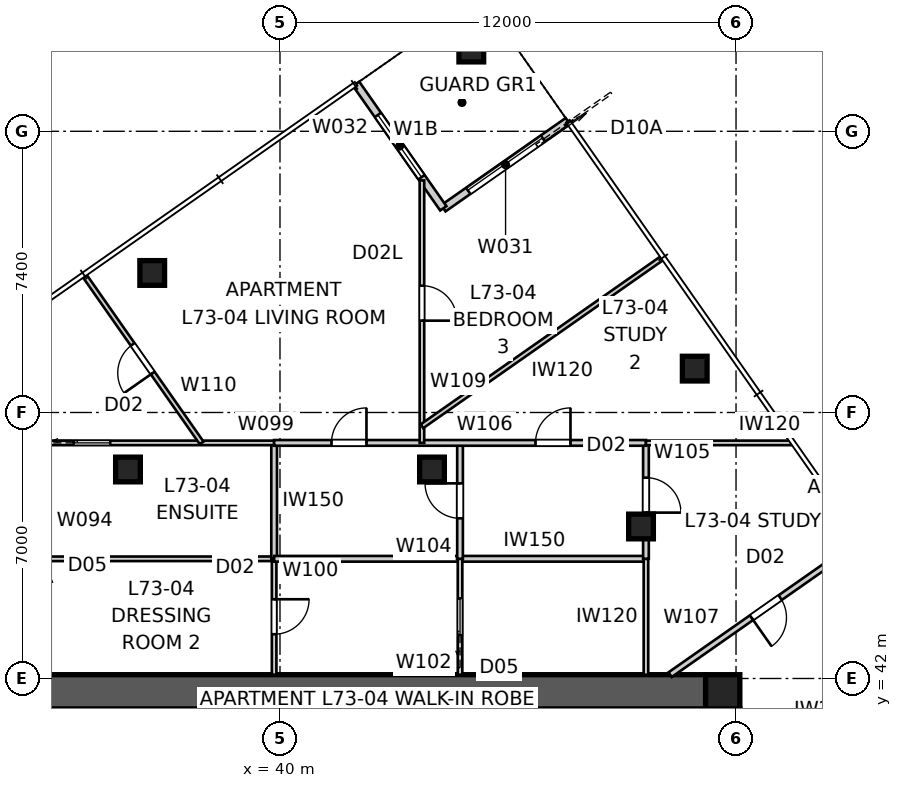
"""IFC4 building model, lengths in metres.
Left out: names, types, materials, properties, quantities, classifications, styles, units other than length and angle.
Written with IfcOpenShell. Run it as: python <this file> out.ifc"""

import sys

from ifc_helpers import new_model, si_unit, direction, frame, frame_2d, origin, origin_2d, place, context, subcontext, project, spatial, polyline, rectangle, outline, extrude, element, fill, save


model = new_model("IFC4")
c1 = context("Model", 3, precision=1e-05, world=origin(), true_north=direction((0.0, 1.0)))
c2 = subcontext(c1, "Body", "Model", "MODEL_VIEW")
j1 = project(units=[si_unit("LENGTHUNIT", "METRE"), si_unit("PLANEANGLEUNIT", "RADIAN")], contexts=[c1])
p1 = place(None, origin())
s1 = spatial("IfcSite", under=j1, at=p1, CompositionType="ELEMENT")
p2 = place(p1, origin())
s2 = spatial("IfcBuilding", under=s1, at=p2, CompositionType="ELEMENT")
p3 = place(p2, frame((0.0, 0.0, 264.2)))
s3 = spatial("IfcBuildingStorey", under=s2, at=p3, CompositionType="ELEMENT", Elevation=264.2)
p4 = place(p3, frame((28.8, 41.65, 0.0), z_axis=(0.0, 0.0, 1.0), x_axis=(1.0, 0.0, 0.0)))
e1 = element("IfcWall", 1, at=p4, inside=s3, PredefinedType="SHEAR", context=c2, shape_type="SweptSolid", body=[
    extrude(outline(polyline([(0.0, -0.45), (22.4, -0.45), (22.4, -0.025), (22.85, -0.025), (22.85, 0.025), (22.4, 0.025), (22.4, 0.45), (0.0, 0.45), (0.0, 0.025), (-0.45, 0.025), (-0.45, -0.025), (0.0, -0.025), (0.0, -0.45)])), origin(), (0.0, 0.0, 1.0), 3.4),
])
p5 = place(p3, frame((51.65, 18.8, 0.0), z_axis=(0.0, 0.0, 1.0), x_axis=(0.0, 1.0, 0.0)))
e2 = element("IfcWall", 2, at=p5, inside=s3, PredefinedType="SHEAR", context=c2, shape_type="SweptSolid", body=[
    extrude(outline(polyline([(0.0, -0.45), (22.4, -0.45), (22.4, -0.025), (22.85, -0.025), (22.85, 0.025), (22.4, 0.025), (22.4, 0.45), (0.0, 0.45), (0.0, 0.025), (-0.45, 0.025), (-0.45, -0.025), (0.0, -0.025), (0.0, -0.45)])), origin(), (0.0, 0.0, 1.0), 3.4),
])
p6 = place(p5, frame((11.14, 0.0, 0.0)))
e3 = element("IfcOpeningElement", 3, at=p6, cuts=e2, PredefinedType="OPENING", context=c2, shape_type="SweptSolid", body=[
    extrude(rectangle(XDim=1.02, YDim=2.4, at=frame_2d((0.51, 1.2))), frame((0.0, 0.46, 0.0), z_axis=(0.0, -1.0, 0.0), x_axis=(1.0, 0.0, 0.0)), (0.0, 0.0, 1.0), 0.92),
])
p7 = place(p3, frame((51.65, 41.65, 0.0), z_axis=(0.0, 0.0, 1.0), x_axis=(1.0, 0.0, 0.0)))
e4 = element("IfcColumn", 4, at=p7, inside=s3, PredefinedType="COLUMN", context=c2, shape_type="SweptSolid", body=[
    extrude(rectangle(XDim=0.9, YDim=0.9, at=origin_2d()), origin(), (0.0, 0.0, 1.0), 3.4),
])
for number, where, z_axis, x_axis in (
    (5, (50.914, 50.155, 0.0), (0.0, 0.0, 1.0), (1.0, 0.0, 0.0)),
    (6, (45.034, 58.551, 0.0), (0.0, 0.0, 1.0), (1.0, 0.0, 0.0)),
    (7, (36.638, 52.672, 0.0), (0.0, 0.0, 1.0), (1.0, 0.0, 0.0)),
):
    element("IfcColumn", number, at=place(p3, frame(where, z_axis=z_axis, x_axis=x_axis)), inside=s3, PredefinedType="COLUMN", context=c2, shape_type="SweptSolid", body=[
        extrude(rectangle(XDim=0.65, YDim=0.65, at=origin_2d()), origin(), (0.0, 0.0, 1.0), 3.2),
    ])
for number, where, z_axis, x_axis in (
    (8, (49.5, 46.0, 0.0), (0.0, 0.0, 1.0), (1.0, 0.0, 0.0)),
    (9, (44.0, 47.5, 0.0), (0.0, 0.0, 1.0), (1.0, 0.0, 0.0)),
    (10, (36.0, 47.5, 0.0), (0.0, 0.0, 1.0), (1.0, 0.0, 0.0)),
):
    element("IfcColumn", number, at=place(p3, frame(where, z_axis=z_axis, x_axis=x_axis)), inside=s3, PredefinedType="COLUMN", context=c2, shape_type="SweptSolid", body=[
        extrude(rectangle(XDim=0.65, YDim=0.65, at=origin_2d()), origin(), (0.0, 0.0, 1.0), 3.4),
    ])
p8 = place(p3, frame((47.574, 56.667, 0.0), z_axis=(0.0, 0.0, 1.0), x_axis=(-0.819165963305, -0.573556557423, 0.0)))
e11 = element("IfcWall", 11, at=p8, inside=s3, PredefinedType="SOLIDWALL", context=c2, shape_type="SweptSolid", body=[
    extrude(rectangle(XDim=4.0, YDim=0.2, at=frame_2d((2.0, 0.0))), origin(), (0.0, 0.0, 1.0), 3.2),
])
p9 = place(p8, frame((0.8, 0.0, 0.0)))
e12 = element("IfcOpeningElement", 12, at=p9, cuts=e11, PredefinedType="OPENING", context=c2, shape_type="SweptSolid", body=[
    extrude(rectangle(XDim=2.4, YDim=2.1, at=frame_2d((1.2, 1.05))), frame((0.0, 0.11, 0.0), z_axis=(0.0, -1.0, 0.0), x_axis=(1.0, 0.0, 0.0)), (0.0, 0.0, 1.0), 0.22),
])
p10 = place(p3, frame((44.298, 54.373, 0.0), z_axis=(0.0, 0.0, 1.0), x_axis=(-0.573597512525, 0.819137286189, 0.0)))
e13 = element("IfcWall", 13, at=p10, inside=s3, PredefinedType="SOLIDWALL", context=c2, shape_type="SweptSolid", body=[
    extrude(rectangle(XDim=4.0, YDim=0.2, at=frame_2d((2.0, 0.0))), origin(), (0.0, 0.0, 1.0), 3.2),
])
p11 = place(p10, frame((1.0, 0.0, 0.4)))
e14 = element("IfcOpeningElement", 14, at=p11, cuts=e13, PredefinedType="OPENING", context=c2, shape_type="SweptSolid", body=[
    extrude(rectangle(XDim=2.0, YDim=1.8, at=frame_2d((1.0, 0.9))), frame((0.0, 0.11, 0.0), z_axis=(0.0, -1.0, 0.0), x_axis=(1.0, 0.0, 0.0)), (0.0, 0.0, 1.0), 0.22),
])
p12 = place(p3, frame((57.612, 42.332, 0.0), z_axis=(0.0, 0.0, 1.0), x_axis=(-0.819161528122, -0.573562891796, 0.0)))
e15 = element("IfcWall", 15, at=p12, inside=s3, PredefinedType="PARTITIONING", context=c2, shape_type="SweptSolid", body=[
    extrude(rectangle(XDim=6.681, YDim=0.25, at=frame_2d((3.341, 0.0))), origin(), (0.0, 0.0, 1.0), 3.2),
])
p13 = place(p3, frame((28.255, 45.148, 0.0), z_axis=(0.0, 0.0, 1.0), x_axis=(0.99999998913, 0.000147442917, 0.0)))
e16 = element("IfcWall", 16, at=p13, inside=s3, PredefinedType="PARTITIONING", context=c2, shape_type="SweptSolid", body=[
    extrude(rectangle(XDim=11.591, YDim=0.12, at=frame_2d((5.795, 0.0))), origin(), (0.0, 0.0, 1.0), 3.2),
])
p14 = place(p3, frame((39.846, 48.2, 0.0), z_axis=(0.0, 0.0, 1.0), x_axis=(0.0, -1.0, 0.0)))
e17 = element("IfcWall", 17, at=p14, inside=s3, PredefinedType="SOLIDWALL", context=c2, shape_type="SweptSolid", body=[
    extrude(rectangle(XDim=3.05, YDim=0.15, at=frame_2d((1.525, 0.0))), origin(), (0.0, 0.0, 1.0), 3.2),
])
p15 = place(p3, frame((33.907, 48.2, 0.0), z_axis=(0.0, 0.0, 1.0), x_axis=(1.0, 0.0, 0.0)))
e18 = element("IfcWall", 18, at=p15, inside=s3, PredefinedType="PARTITIONING", context=c2, shape_type="SweptSolid", body=[
    extrude(rectangle(XDim=5.939, YDim=0.12, at=frame_2d((2.969, 0.0))), origin(), (0.0, 0.0, 1.0), 3.2),
])
p16 = place(p15, frame((0.666, 0.0, 0.0)))
e19 = element("IfcOpeningElement", 19, at=p16, cuts=e18, PredefinedType="OPENING", context=c2, shape_type="SweptSolid", body=[
    extrude(rectangle(XDim=0.96, YDim=2.1, at=frame_2d((0.48, 1.05))), frame((0.0, 0.07, 0.0), z_axis=(0.0, -1.0, 0.0), x_axis=(1.0, 0.0, 0.0)), (0.0, 0.0, 1.0), 0.14),
])
p17 = place(p3, frame((39.846, 45.15, 0.0), z_axis=(0.0, 0.0, 1.0), x_axis=(0.0, -1.0, 0.0)))
e20 = element("IfcWall", 20, at=p17, inside=s3, PredefinedType="PARTITIONING", context=c2, shape_type="SweptSolid", body=[
    extrude(rectangle(XDim=3.05, YDim=0.12, at=frame_2d((1.525, 0.0))), origin(), (0.0, 0.0, 1.0), 3.2),
])
p18 = place(p17, frame((1.065, 0.0, 0.0)))
e21 = element("IfcOpeningElement", 21, at=p18, cuts=e20, PredefinedType="OPENING", context=c2, shape_type="SweptSolid", body=[
    extrude(rectangle(XDim=0.92, YDim=2.34, at=frame_2d((0.46, 1.17))), frame((0.0, 0.07, 0.0), z_axis=(0.0, -1.0, 0.0), x_axis=(1.0, 0.0, 0.0)), (0.0, 0.0, 1.0), 0.14),
])
p19 = place(p3, frame((39.846, 45.15, 0.0), z_axis=(0.0, 0.0, 1.0), x_axis=(1.0, 0.0, 0.0)))
e22 = element("IfcWall", 22, at=p19, inside=s3, PredefinedType="SOLIDWALL", context=c2, shape_type="SweptSolid", body=[
    extrude(rectangle(XDim=9.784, YDim=0.15, at=frame_2d((4.892, 0.0))), origin(), (0.0, 0.0, 1.0), 3.2),
])
p20 = place(p3, frame((44.738, 42.1, 0.0), z_axis=(0.0, 0.0, 1.0), x_axis=(0.0, 1.0, 0.0)))
e23 = element("IfcWall", 23, at=p20, inside=s3, PredefinedType="PARTITIONING", context=c2, shape_type="SweptSolid", body=[
    extrude(rectangle(XDim=3.05, YDim=0.12, at=frame_2d((1.525, 0.0))), origin(), (0.0, 0.0, 1.0), 3.2),
])
p21 = place(p20, frame((1.045, 0.0, 0.0)))
e24 = element("IfcOpeningElement", 24, at=p21, cuts=e23, PredefinedType="OPENING", context=c2, shape_type="SweptSolid", body=[
    extrude(rectangle(XDim=0.96, YDim=2.1, at=frame_2d((0.48, 1.05))), frame((0.0, 0.07, 0.0), z_axis=(0.0, -1.0, 0.0), x_axis=(1.0, 0.0, 0.0)), (0.0, 0.0, 1.0), 0.14),
])
p22 = place(p3, frame((49.63, 45.15, 0.0), z_axis=(0.0, 0.0, 1.0), x_axis=(0.0, -1.0, 0.0)))
e25 = element("IfcWall", 25, at=p22, inside=s3, PredefinedType="PARTITIONING", context=c2, shape_type="SweptSolid", body=[
    extrude(rectangle(XDim=3.05, YDim=0.12, at=frame_2d((1.525, 0.0))), origin(), (0.0, 0.0, 1.0), 3.2),
])
p23 = place(p3, frame((44.738, 45.15, 0.0), z_axis=(0.0, 0.0, 1.0), x_axis=(0.0, 1.0, 0.0)))
e26 = element("IfcWall", 26, at=p23, inside=s3, PredefinedType="SOLIDWALL", context=c2, shape_type="SweptSolid", body=[
    extrude(rectangle(XDim=3.05, YDim=0.15, at=frame_2d((1.525, 0.0))), origin(), (0.0, 0.0, 1.0), 3.2),
])
p24 = place(p23, frame((1.065, 0.0, 0.0)))
e27 = element("IfcOpeningElement", 27, at=p24, cuts=e26, PredefinedType="OPENING", context=c2, shape_type="SweptSolid", body=[
    extrude(rectangle(XDim=0.92, YDim=2.1, at=frame_2d((0.46, 1.05))), frame((0.0, 0.085, 0.0), z_axis=(0.0, -1.0, 0.0), x_axis=(1.0, 0.0, 0.0)), (0.0, 0.0, 1.0), 0.17),
])
p25 = place(p3, frame((49.63, 48.2, 0.0), z_axis=(0.0, 0.0, 1.0), x_axis=(0.0, -1.0, 0.0)))
e28 = element("IfcWall", 28, at=p25, inside=s3, PredefinedType="SOLIDWALL", context=c2, shape_type="SweptSolid", body=[
    extrude(rectangle(XDim=3.05, YDim=0.15, at=frame_2d((1.525, 0.0))), origin(), (0.0, 0.0, 1.0), 3.2),
])
p26 = place(p25, frame((0.915, 0.0, 0.0)))
e29 = element("IfcOpeningElement", 29, at=p26, cuts=e28, PredefinedType="OPENING", context=c2, shape_type="SweptSolid", body=[
    extrude(rectangle(XDim=0.92, YDim=2.34, at=frame_2d((0.46, 1.17))), frame((0.0, 0.085, 0.0), z_axis=(0.0, -1.0, 0.0), x_axis=(1.0, 0.0, 0.0)), (0.0, 0.0, 1.0), 0.17),
])
p27 = place(p3, frame((39.846, 48.2, 0.0), z_axis=(0.0, 0.0, 1.0), x_axis=(1.0, 0.0, 0.0)))
e30 = element("IfcWall", 30, at=p27, inside=s3, PredefinedType="SOLIDWALL", context=c2, shape_type="SweptSolid", body=[
    extrude(rectangle(XDim=9.784, YDim=0.15, at=frame_2d((4.892, 0.0))), origin(), (0.0, 0.0, 1.0), 3.2),
])
p28 = place(p27, frame((1.51, 0.0, 0.0)))
e31 = element("IfcOpeningElement", 31, at=p28, cuts=e30, PredefinedType="OPENING", context=c2, shape_type="SweptSolid", body=[
    extrude(rectangle(XDim=0.92, YDim=2.34, at=frame_2d((0.46, 1.17))), frame((0.0, 0.085, 0.0), z_axis=(0.0, -1.0, 0.0), x_axis=(1.0, 0.0, 0.0)), (0.0, 0.0, 1.0), 0.17),
])
p29 = place(p27, frame((6.878, 0.0, 0.0)))
e32 = element("IfcOpeningElement", 32, at=p29, cuts=e30, PredefinedType="OPENING", context=c2, shape_type="SweptSolid", body=[
    extrude(rectangle(XDim=0.92, YDim=2.34, at=frame_2d((0.46, 1.17))), frame((0.0, 0.085, 0.0), z_axis=(0.0, -1.0, 0.0), x_axis=(1.0, 0.0, 0.0)), (0.0, 0.0, 1.0), 0.17),
])
p30 = place(p3, frame((55.271, 45.605, 0.0), z_axis=(0.0, 0.0, 1.0), x_axis=(-0.819158711158, -0.573566914958, 0.0)))
e33 = element("IfcWall", 33, at=p30, inside=s3, PredefinedType="SOLIDWALL", context=c2, shape_type="SweptSolid", body=[
    extrude(rectangle(XDim=6.111, YDim=0.15, at=frame_2d((3.055, 0.0))), origin(), (0.0, 0.0, 1.0), 3.2),
])
p31 = place(p30, frame((2.575, 0.0, 0.0)))
e34 = element("IfcOpeningElement", 34, at=p31, cuts=e33, PredefinedType="OPENING", context=c2, shape_type="SweptSolid", body=[
    extrude(rectangle(XDim=0.92, YDim=2.34, at=frame_2d((0.46, 1.17))), frame((0.0, 0.085, 0.0), z_axis=(0.0, -1.0, 0.0), x_axis=(1.0, 0.0, 0.0)), (0.0, 0.0, 1.0), 0.17),
])
p32 = place(p3, frame((49.63, 48.2, 0.0), z_axis=(0.0, 0.0, 1.0), x_axis=(1.0, 0.0, 0.0)))
e35 = element("IfcWall", 35, at=p32, inside=s3, PredefinedType="PARTITIONING", context=c2, shape_type="SweptSolid", body=[
    extrude(rectangle(XDim=3.824, YDim=0.12, at=frame_2d((1.912, 0.0))), origin(), (0.0, 0.0, 1.0), 3.2),
])
p33 = place(p3, frame((43.735, 55.106, 0.0), z_axis=(0.0, 0.0, 1.0), x_axis=(0.0, -1.0, 0.0)))
e36 = element("IfcWall", 36, at=p33, inside=s3, PredefinedType="PARTITIONING", context=c2, shape_type="SweptSolid", body=[
    extrude(rectangle(XDim=6.906, YDim=0.12, at=frame_2d((3.453, 0.0))), origin(), (0.0, 0.0, 1.0), 2.3),
])
p34 = place(p33, frame((2.77, 0.0, 0.0)))
e37 = element("IfcOpeningElement", 37, at=p34, cuts=e36, PredefinedType="OPENING", context=c2, shape_type="SweptSolid", body=[
    extrude(rectangle(XDim=0.92, YDim=2.1, at=frame_2d((0.46, 1.05))), frame((0.0, 0.07, 0.0), z_axis=(0.0, -1.0, 0.0), x_axis=(1.0, 0.0, 0.0)), (0.0, 0.0, 1.0), 0.14),
])
p35 = place(p3, frame((37.938, 48.2, 0.0), z_axis=(0.0, 0.0, 1.0), x_axis=(-0.573560001964, 0.819163551525, 0.0)))
e38 = element("IfcWall", 38, at=p35, inside=s3, PredefinedType="PARTITIONING", context=c2, shape_type="SweptSolid", body=[
    extrude(rectangle(XDim=5.369, YDim=0.12, at=frame_2d((2.685, 0.0))), origin(), (0.0, 0.0, 1.0), 3.2),
])
p36 = place(p35, frame((2.244, 0.0, 0.0)))
e39 = element("IfcOpeningElement", 39, at=p36, cuts=e38, PredefinedType="OPENING", context=c2, shape_type="SweptSolid", body=[
    extrude(rectangle(XDim=0.92, YDim=2.34, at=frame_2d((0.46, 1.17))), frame((0.0, 0.07, 0.0), z_axis=(0.0, -1.0, 0.0), x_axis=(1.0, 0.0, 0.0)), (0.0, 0.0, 1.0), 0.14),
])
p37 = place(p3, frame((50.051, 53.06, 0.0), z_axis=(0.0, 0.0, 1.0), x_axis=(-0.819161994693, -0.573562225439, 0.0)))
e40 = element("IfcWall", 40, at=p37, inside=s3, PredefinedType="PARTITIONING", context=c2, shape_type="SweptSolid", body=[
    extrude(rectangle(XDim=7.71, YDim=0.12, at=frame_2d((3.855, 0.0))), origin(), (0.0, 0.0, 1.0), 3.2),
])
p38 = place(p9, origin())
e41 = element("IfcDoor", 41, at=p38, inside=s3, OperationType="SLIDING_TO_LEFT", PredefinedType="DOOR", context=c2, shape_type="SweptSolid", body=[
    extrude(rectangle(XDim=2.4, YDim=2.1, at=frame_2d((1.2, 1.05))), frame((0.0, 0.025, 0.0), z_axis=(0.0, -1.0, 0.0), x_axis=(1.0, 0.0, 0.0)), (0.0, 0.0, 1.0), 0.05),
])
fill(e12, e41)
p39 = place(p11, origin())
e42 = element("IfcWindow", 42, at=p39, inside=s3, PartitioningType="SINGLE_PANEL", PredefinedType="WINDOW", context=c2, shape_type="SweptSolid", body=[
    extrude(rectangle(XDim=2.0, YDim=1.8, at=frame_2d((1.0, 0.9))), frame((0.0, 0.03, 0.0), z_axis=(0.0, -1.0, 0.0), x_axis=(1.0, 0.0, 0.0)), (0.0, 0.0, 1.0), 0.06),
])
fill(e14, e42)
p40 = place(p36, origin())
e43 = element("IfcDoor", 43, at=p40, inside=s3, OperationType="SINGLE_SWING_LEFT", PredefinedType="DOOR", context=c2, shape_type="SweptSolid", body=[
    extrude(rectangle(XDim=0.92, YDim=2.34, at=frame_2d((0.46, 1.17))), frame((0.0, 0.025, 0.0), z_axis=(0.0, -1.0, 0.0), x_axis=(1.0, 0.0, 0.0)), (0.0, 0.0, 1.0), 0.05),
])
fill(e39, e43)
p41 = place(p16, origin())
e44 = element("IfcDoor", 44, at=p41, inside=s3, OperationType="SLIDING_TO_LEFT", PredefinedType="DOOR", context=c2, shape_type="SweptSolid", body=[
    extrude(rectangle(XDim=0.96, YDim=2.1, at=frame_2d((0.48, 1.05))), frame((0.0, 0.025, 0.0), z_axis=(0.0, -1.0, 0.0), x_axis=(1.0, 0.0, 0.0)), (0.0, 0.0, 1.0), 0.05),
])
fill(e19, e44)
p42 = place(p34, origin())
e45 = element("IfcDoor", 45, at=p42, inside=s3, OperationType="SINGLE_SWING_RIGHT", PredefinedType="DOOR", context=c2, shape_type="SweptSolid", body=[
    extrude(rectangle(XDim=0.92, YDim=2.1, at=frame_2d((0.46, 1.05))), frame((0.0, 0.025, 0.0), z_axis=(0.0, -1.0, 0.0), x_axis=(1.0, 0.0, 0.0)), (0.0, 0.0, 1.0), 0.05),
])
fill(e37, e45)
p43 = place(p28, origin())
e46 = element("IfcDoor", 46, at=p43, inside=s3, OperationType="SINGLE_SWING_RIGHT", PredefinedType="DOOR", context=c2, shape_type="SweptSolid", body=[
    extrude(rectangle(XDim=0.92, YDim=2.34, at=frame_2d((0.46, 1.17))), frame((0.0, 0.025, 0.0), z_axis=(0.0, -1.0, 0.0), x_axis=(1.0, 0.0, 0.0)), (0.0, 0.0, 1.0), 0.05),
])
fill(e31, e46)
p44 = place(p18, origin())
e47 = element("IfcDoor", 47, at=p44, inside=s3, OperationType="SINGLE_SWING_LEFT", PredefinedType="DOOR", context=c2, shape_type="SweptSolid", body=[
    extrude(rectangle(XDim=0.92, YDim=2.34, at=frame_2d((0.46, 1.17))), frame((0.0, 0.025, 0.0), z_axis=(0.0, -1.0, 0.0), x_axis=(1.0, 0.0, 0.0)), (0.0, 0.0, 1.0), 0.05),
])
fill(e21, e47)
p45 = place(p24, origin())
e48 = element("IfcDoor", 48, at=p45, inside=s3, OperationType="SINGLE_SWING_RIGHT", PredefinedType="DOOR", context=c2, shape_type="SweptSolid", body=[
    extrude(rectangle(XDim=0.92, YDim=2.1, at=frame_2d((0.46, 1.05))), frame((0.0, 0.025, 0.0), z_axis=(0.0, -1.0, 0.0), x_axis=(1.0, 0.0, 0.0)), (0.0, 0.0, 1.0), 0.05),
])
fill(e27, e48)
p46 = place(p21, origin())
e49 = element("IfcDoor", 49, at=p46, inside=s3, OperationType="SLIDING_TO_LEFT", PredefinedType="DOOR", context=c2, shape_type="SweptSolid", body=[
    extrude(rectangle(XDim=0.96, YDim=2.1, at=frame_2d((0.48, 1.05))), frame((0.0, 0.025, 0.0), z_axis=(0.0, -1.0, 0.0), x_axis=(1.0, 0.0, 0.0)), (0.0, 0.0, 1.0), 0.05),
])
fill(e24, e49)
p47 = place(p29, origin())
e50 = element("IfcDoor", 50, at=p47, inside=s3, OperationType="SINGLE_SWING_RIGHT", PredefinedType="DOOR", context=c2, shape_type="SweptSolid", body=[
    extrude(rectangle(XDim=0.92, YDim=2.34, at=frame_2d((0.46, 1.17))), frame((0.0, 0.025, 0.0), z_axis=(0.0, -1.0, 0.0), x_axis=(1.0, 0.0, 0.0)), (0.0, 0.0, 1.0), 0.05),
])
fill(e32, e50)
p48 = place(p26, origin())
e51 = element("IfcDoor", 51, at=p48, inside=s3, OperationType="SINGLE_SWING_RIGHT", PredefinedType="DOOR", context=c2, shape_type="SweptSolid", body=[
    extrude(rectangle(XDim=0.92, YDim=2.34, at=frame_2d((0.46, 1.17))), frame((0.0, 0.025, 0.0), z_axis=(0.0, -1.0, 0.0), x_axis=(1.0, 0.0, 0.0)), (0.0, 0.0, 1.0), 0.05),
])
fill(e29, e51)
p49 = place(p31, origin())
e52 = element("IfcDoor", 52, at=p49, inside=s3, OperationType="SINGLE_SWING_RIGHT", PredefinedType="DOOR", context=c2, shape_type="SweptSolid", body=[
    extrude(rectangle(XDim=0.92, YDim=2.34, at=frame_2d((0.46, 1.17))), frame((0.0, 0.025, 0.0), z_axis=(0.0, -1.0, 0.0), x_axis=(1.0, 0.0, 0.0)), (0.0, 0.0, 1.0), 0.05),
])
fill(e34, e52)
save(model, sys.argv[1])
